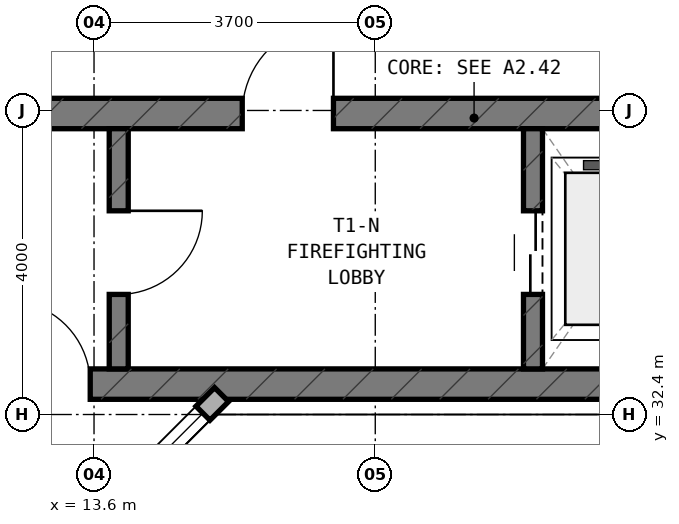
"""IFC4 building model, lengths in metres.
Left out: names, types, materials, properties, quantities, classifications, styles, units other than length and angle.
Written with IfcOpenShell. Run it as: python <this file> out.ifc"""

import sys

from ifc_helpers import new_model, si_unit, direction, frame, frame_2d, origin, place, context, subcontext, project, spatial, rectangle, extrude, element, fill, save


model = new_model("IFC4")
c1 = context("Model", 3, precision=1e-05, world=origin(), true_north=direction((0.0, 1.0)))
c2 = subcontext(c1, "Body", "Model", "MODEL_VIEW")
j1 = project(units=[si_unit("LENGTHUNIT", "METRE"), si_unit("PLANEANGLEUNIT", "RADIAN")], contexts=[c1])
p1 = place(None, origin())
s1 = spatial("IfcSite", under=j1, at=p1, CompositionType="ELEMENT")
p2 = place(p1, origin())
s2 = spatial("IfcBuilding", under=s1, at=p2, CompositionType="ELEMENT")
p3 = place(p2, frame((0.0, 0.0, 195.5)))
s3 = spatial("IfcBuildingStorey", under=s2, at=p3, CompositionType="ELEMENT", Elevation=195.5)
p4 = place(p3, frame((6.4, 32.8, 0.0), z_axis=(0.0, 0.0, 1.0), x_axis=(1.0, 0.0, 0.0)))
e1 = element("IfcWall", 1, at=p4, inside=s3, PredefinedType="SHEAR", context=c2, shape_type="SweptSolid", body=[
    extrude(rectangle(XDim=24.4, YDim=0.4, at=frame_2d((12.2, 0.0))), origin(), (0.0, 0.0, 1.0), 3.6),
])
p5 = place(p4, frame((6.05, 0.0, 0.0)))
e2 = element("IfcOpeningElement", 2, at=p5, cuts=e1, PredefinedType="OPENING", context=c2, shape_type="SweptSolid", body=[
    extrude(rectangle(XDim=1.1, YDim=2.15, at=frame_2d((0.55, 1.075))), frame((0.0, 0.21, 0.0), z_axis=(0.0, -1.0, 0.0), x_axis=(1.0, 0.0, 0.0)), (0.0, 0.0, 1.0), 0.42),
])
p6 = place(p3, frame((6.4, 36.36, 0.0), z_axis=(0.0, 0.0, 1.0), x_axis=(1.0, 0.0, 0.0)))
e3 = element("IfcWall", 3, at=p6, inside=s3, PredefinedType="SHEAR", context=c2, shape_type="SweptSolid", body=[
    extrude(rectangle(XDim=24.4, YDim=0.4, at=frame_2d((12.2, 0.0))), origin(), (0.0, 0.0, 1.0), 3.6),
])
p7 = place(p6, frame((9.15, 0.0, 0.0)))
e4 = element("IfcOpeningElement", 4, at=p7, cuts=e3, PredefinedType="OPENING", context=c2, shape_type="SweptSolid", body=[
    extrude(rectangle(XDim=1.2, YDim=2.15, at=frame_2d((0.6, 1.075))), frame((0.0, 0.21, 0.0), z_axis=(0.0, -1.0, 0.0), x_axis=(1.0, 0.0, 0.0)), (0.0, 0.0, 1.0), 0.42),
])
p8 = place(p6, frame((19.2, 0.0, 0.0)))
e5 = element("IfcOpeningElement", 5, at=p8, cuts=e3, PredefinedType="OPENING", context=c2, shape_type="SweptSolid", body=[
    extrude(rectangle(XDim=0.85, YDim=2.1, at=frame_2d((0.425, 1.05))), frame((0.0, 0.21, 0.0), z_axis=(0.0, -1.0, 0.0), x_axis=(1.0, 0.0, 0.0)), (0.0, 0.0, 1.0), 0.42),
])
p9 = place(p6, frame((16.94, 0.0, 0.0)))
e6 = element("IfcOpeningElement", 6, at=p9, cuts=e3, PredefinedType="OPENING", context=c2, shape_type="SweptSolid", body=[
    extrude(rectangle(XDim=0.85, YDim=2.1, at=frame_2d((0.425, 1.05))), frame((0.0, 0.21, 0.0), z_axis=(0.0, -1.0, 0.0), x_axis=(1.0, 0.0, 0.0)), (0.0, 0.0, 1.0), 0.42),
])
p10 = place(p3, frame((13.925, 33.0, 0.0), z_axis=(0.0, 0.0, 1.0), x_axis=(0.0, 1.0, 0.0)))
e7 = element("IfcWall", 7, at=p10, inside=s3, PredefinedType="STANDARD", context=c2, shape_type="SweptSolid", body=[
    extrude(rectangle(XDim=3.16, YDim=0.25, at=frame_2d((1.58, 0.0))), origin(), (0.0, 0.0, 1.0), 3.28),
])
p11 = place(p10, frame((0.98, 0.0, 0.0)))
e8 = element("IfcOpeningElement", 8, at=p11, cuts=e7, PredefinedType="OPENING", context=c2, shape_type="SweptSolid", body=[
    extrude(rectangle(XDim=1.1, YDim=2.15, at=frame_2d((0.55, 1.075))), frame((0.0, 0.135, 0.0), z_axis=(0.0, -1.0, 0.0), x_axis=(1.0, 0.0, 0.0)), (0.0, 0.0, 1.0), 0.27),
])
p12 = place(p3, frame((19.375, 33.0, 0.0), z_axis=(0.0, 0.0, 1.0), x_axis=(0.0, 1.0, 0.0)))
e9 = element("IfcWall", 9, at=p12, inside=s3, PredefinedType="STANDARD", context=c2, shape_type="SweptSolid", body=[
    extrude(rectangle(XDim=3.16, YDim=0.25, at=frame_2d((1.58, 0.0))), origin(), (0.0, 0.0, 1.0), 3.28),
])
p13 = place(p12, frame((0.98, 0.0, 0.0)))
e10 = element("IfcOpeningElement", 10, at=p13, cuts=e9, PredefinedType="OPENING", context=c2, shape_type="SweptSolid", body=[
    extrude(rectangle(XDim=1.1, YDim=2.15, at=frame_2d((0.55, 1.075))), frame((0.0, 0.135, 0.0), z_axis=(0.0, -1.0, 0.0), x_axis=(1.0, 0.0, 0.0)), (0.0, 0.0, 1.0), 0.27),
])
p14 = place(p3, frame((13.515, 30.899, 0.0), z_axis=(0.0, 0.0, 1.0), x_axis=(0.707106781187, 0.707106781187, 0.0)))
e11 = element("IfcWall", 11, at=p14, inside=s3, PredefinedType="STANDARD", context=c2, shape_type="SweptSolid", body=[
    extrude(rectangle(XDim=2.493, YDim=0.26, at=frame_2d((1.247, 0.0))), origin(), (0.0, 0.0, 1.0), 3.28),
])
p15 = place(p14, frame((0.347, 0.0, 0.85)))
e12 = element("IfcOpeningElement", 12, at=p15, cuts=e11, PredefinedType="OPENING", context=c2, shape_type="SweptSolid", body=[
    extrude(rectangle(XDim=1.8, YDim=1.5, at=frame_2d((0.9, 0.75))), frame((0.0, 0.14, 0.0), z_axis=(0.0, -1.0, 0.0), x_axis=(1.0, 0.0, 0.0)), (0.0, 0.0, 1.0), 0.28),
])
p16 = place(p15, origin())
e13 = element("IfcWindow", 13, at=p16, inside=s3, PartitioningType="SINGLE_PANEL", PredefinedType="WINDOW", context=c2, shape_type="SweptSolid", body=[
    extrude(rectangle(XDim=1.8, YDim=1.5, at=frame_2d((0.9, 0.75))), frame((0.0, 0.03, 0.0), z_axis=(0.0, -1.0, 0.0), x_axis=(1.0, 0.0, 0.0)), (0.0, 0.0, 1.0), 0.06),
])
fill(e12, e13)
p17 = place(p11, frame((1.1, 0.0, 0.0), z_axis=(0.0, 0.0, 1.0), x_axis=(-1.0, 0.0, 0.0)))
e14 = element("IfcDoor", 14, at=p17, inside=s3, OperationType="SINGLE_SWING_LEFT", PredefinedType="DOOR", context=c2, shape_type="SweptSolid", body=[
    extrude(rectangle(XDim=1.1, YDim=2.15, at=frame_2d((0.55, 1.075))), frame((0.0, 0.025, 0.0), z_axis=(0.0, -1.0, 0.0), x_axis=(1.0, 0.0, 0.0)), (0.0, 0.0, 1.0), 0.05),
])
fill(e8, e14)
p18 = place(p7, origin())
e15 = element("IfcDoor", 15, at=p18, inside=s3, OperationType="SINGLE_SWING_RIGHT", PredefinedType="DOOR", context=c2, shape_type="SweptSolid", body=[
    extrude(rectangle(XDim=1.2, YDim=2.15, at=frame_2d((0.6, 1.075))), frame((0.0, 0.025, 0.0), z_axis=(0.0, -1.0, 0.0), x_axis=(1.0, 0.0, 0.0)), (0.0, 0.0, 1.0), 0.05),
])
fill(e4, e15)
p19 = place(p13, origin())
e16 = element("IfcDoor", 16, at=p19, inside=s3, OperationType="DOUBLE_DOOR_SLIDING", PredefinedType="DOOR", context=c2, shape_type="SweptSolid", body=[
    extrude(rectangle(XDim=1.1, YDim=2.15, at=frame_2d((0.55, 1.075))), frame((0.0, 0.025, 0.0), z_axis=(0.0, -1.0, 0.0), x_axis=(1.0, 0.0, 0.0)), (0.0, 0.0, 1.0), 0.05),
])
fill(e10, e16)
p20 = place(p5, origin())
e17 = element("IfcDoor", 17, at=p20, inside=s3, OperationType="SINGLE_SWING_LEFT", PredefinedType="DOOR", context=c2, shape_type="SweptSolid", body=[
    extrude(rectangle(XDim=1.1, YDim=2.15, at=frame_2d((0.55, 1.075))), frame((0.0, 0.025, 0.0), z_axis=(0.0, -1.0, 0.0), x_axis=(1.0, 0.0, 0.0)), (0.0, 0.0, 1.0), 0.05),
])
fill(e2, e17)
save(model, sys.argv[1])
